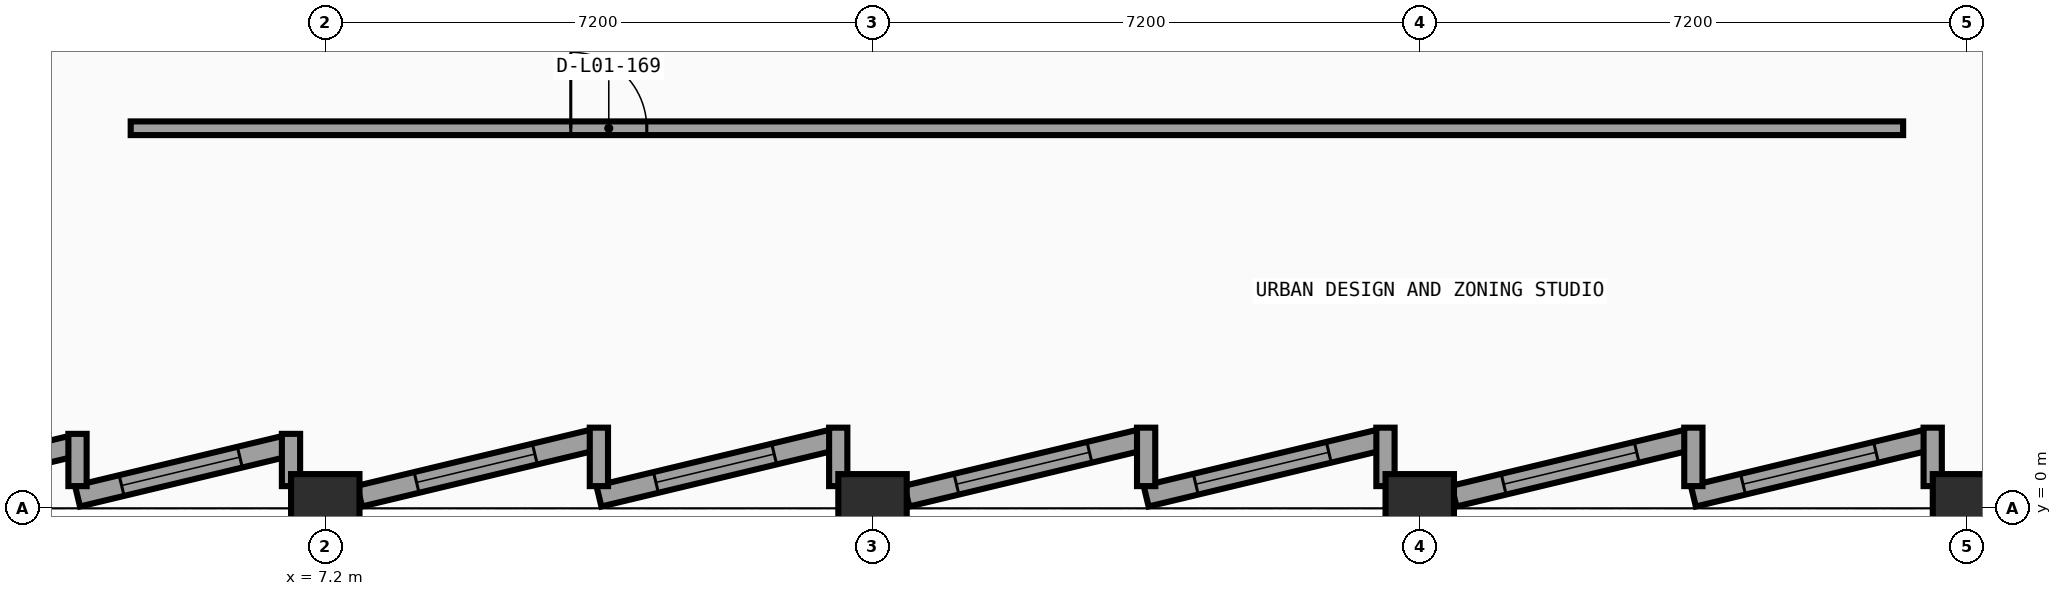
"""IFC4 building model, lengths in metres.
Left out: names, types, materials, properties, quantities, classifications, styles, units other than length and angle.
Written with IfcOpenShell. Run it as: python <this file> out.ifc"""

import sys

from ifc_helpers import new_model, si_unit, direction, frame, frame_2d, origin, origin_2d, place, context, subcontext, project, spatial, rectangle, extrude, element, fill, save


model = new_model("IFC4")
c1 = context("Model", 3, precision=1e-05, world=origin(), true_north=direction((0.0, 1.0)))
c2 = subcontext(c1, "Body", "Model", "MODEL_VIEW")
j1 = project(units=[si_unit("LENGTHUNIT", "METRE"), si_unit("PLANEANGLEUNIT", "RADIAN")], contexts=[c1])
p1 = place(None, origin())
s1 = spatial("IfcSite", under=j1, at=p1, CompositionType="ELEMENT")
p2 = place(p1, origin())
s2 = spatial("IfcBuilding", under=s1, at=p2, CompositionType="ELEMENT")
p3 = place(p2, frame((0.0, 0.0, 5.4)))
s3 = spatial("IfcBuildingStorey", under=s2, at=p3, CompositionType="ELEMENT", Elevation=5.4)
for number, where, z_axis, x_axis in (
    (1, (7.2, 0.0, 0.0), (0.0, 0.0, 1.0), (1.0, 0.0, 0.0)),
    (2, (14.4, 0.0, 0.0), (0.0, 0.0, 1.0), (1.0, 0.0, 0.0)),
    (3, (21.6, 0.0, 0.0), (0.0, 0.0, 1.0), (1.0, 0.0, 0.0)),
    (4, (28.8, 0.0, 0.0), (0.0, 0.0, 1.0), (1.0, 0.0, 0.0)),
):
    element("IfcColumn", number, at=place(p3, frame(where, z_axis=z_axis, x_axis=x_axis)), inside=s3, PredefinedType="COLUMN", context=c2, shape_type="SweptSolid", body=[
        extrude(rectangle(XDim=0.9, YDim=0.9, at=origin_2d()), origin(), (0.0, 0.0, 1.0), 4.8),
    ])
p4 = place(p3, frame((28.257, 0.894, 0.0), z_axis=(0.0, 0.0, 1.0), x_axis=(-0.972366148661, -0.233461073712, 0.0)))
e5 = element("IfcWall", 5, at=p4, inside=s3, PredefinedType="SOLIDWALL", context=c2, shape_type="SweptSolid", body=[
    extrude(rectangle(XDim=3.144, YDim=0.28, at=frame_2d((1.572, 0.0))), origin(), (0.0, 0.0, 1.0), 3.751),
])
p5 = place(p4, frame((0.672, 0.0, 0.8)))
e6 = element("IfcOpeningElement", 6, at=p5, cuts=e5, PredefinedType="OPENING", context=c2, shape_type="SweptSolid", body=[
    extrude(rectangle(XDim=1.8, YDim=1.85, at=frame_2d((0.9, 0.925))), frame((0.0, 0.15, 0.0), z_axis=(0.0, -1.0, 0.0), x_axis=(1.0, 0.0, 0.0)), (0.0, 0.0, 1.0), 0.3),
])
p6 = place(p3, frame((28.349, 1.061, 0.0), z_axis=(0.0, 0.0, 1.0), x_axis=(0.0, -1.0, 0.0)))
e7 = element("IfcWall", 7, at=p6, inside=s3, PredefinedType="SOLIDWALL", context=c2, shape_type="SweptSolid", body=[
    extrude(rectangle(XDim=0.769, YDim=0.24, at=frame_2d((0.385, 0.0))), origin(), (0.0, 0.0, 1.0), 4.52),
])
p7 = place(p3, frame((25.108, 0.894, 0.0), z_axis=(0.0, 0.0, 1.0), x_axis=(-0.972366148661, -0.233461073712, 0.0)))
e8 = element("IfcWall", 8, at=p7, inside=s3, PredefinedType="SOLIDWALL", context=c2, shape_type="SweptSolid", body=[
    extrude(rectangle(XDim=3.144, YDim=0.28, at=frame_2d((1.572, 0.0))), origin(), (0.0, 0.0, 1.0), 3.751),
])
p8 = place(p7, frame((0.672, 0.0, 0.8)))
e9 = element("IfcOpeningElement", 9, at=p8, cuts=e8, PredefinedType="OPENING", context=c2, shape_type="SweptSolid", body=[
    extrude(rectangle(XDim=1.8, YDim=1.85, at=frame_2d((0.9, 0.925))), frame((0.0, 0.15, 0.0), z_axis=(0.0, -1.0, 0.0), x_axis=(1.0, 0.0, 0.0)), (0.0, 0.0, 1.0), 0.3),
])
p9 = place(p3, frame((25.2, 1.061, 0.0), z_axis=(0.0, 0.0, 1.0), x_axis=(0.0, -1.0, 0.0)))
e10 = element("IfcWall", 10, at=p9, inside=s3, PredefinedType="SOLIDWALL", context=c2, shape_type="SweptSolid", body=[
    extrude(rectangle(XDim=0.769, YDim=0.24, at=frame_2d((0.385, 0.0))), origin(), (0.0, 0.0, 1.0), 4.52),
])
p10 = place(p3, frame((21.057, 0.894, 0.0), z_axis=(0.0, 0.0, 1.0), x_axis=(-0.972366148661, -0.233461073712, 0.0)))
e11 = element("IfcWall", 11, at=p10, inside=s3, PredefinedType="SOLIDWALL", context=c2, shape_type="SweptSolid", body=[
    extrude(rectangle(XDim=3.144, YDim=0.28, at=frame_2d((1.572, 0.0))), origin(), (0.0, 0.0, 1.0), 3.751),
])
p11 = place(p10, frame((0.672, 0.0, 0.8)))
e12 = element("IfcOpeningElement", 12, at=p11, cuts=e11, PredefinedType="OPENING", context=c2, shape_type="SweptSolid", body=[
    extrude(rectangle(XDim=1.8, YDim=1.85, at=frame_2d((0.9, 0.925))), frame((0.0, 0.15, 0.0), z_axis=(0.0, -1.0, 0.0), x_axis=(1.0, 0.0, 0.0)), (0.0, 0.0, 1.0), 0.3),
])
p12 = place(p3, frame((21.149, 1.061, 0.0), z_axis=(0.0, 0.0, 1.0), x_axis=(0.0, -1.0, 0.0)))
e13 = element("IfcWall", 13, at=p12, inside=s3, PredefinedType="SOLIDWALL", context=c2, shape_type="SweptSolid", body=[
    extrude(rectangle(XDim=0.769, YDim=0.24, at=frame_2d((0.385, 0.0))), origin(), (0.0, 0.0, 1.0), 4.52),
])
p13 = place(p3, frame((17.908, 0.894, 0.0), z_axis=(0.0, 0.0, 1.0), x_axis=(-0.972366148661, -0.233461073712, 0.0)))
e14 = element("IfcWall", 14, at=p13, inside=s3, PredefinedType="SOLIDWALL", context=c2, shape_type="SweptSolid", body=[
    extrude(rectangle(XDim=3.144, YDim=0.28, at=frame_2d((1.572, 0.0))), origin(), (0.0, 0.0, 1.0), 3.751),
])
p14 = place(p13, frame((0.672, 0.0, 0.8)))
e15 = element("IfcOpeningElement", 15, at=p14, cuts=e14, PredefinedType="OPENING", context=c2, shape_type="SweptSolid", body=[
    extrude(rectangle(XDim=1.8, YDim=1.85, at=frame_2d((0.9, 0.925))), frame((0.0, 0.15, 0.0), z_axis=(0.0, -1.0, 0.0), x_axis=(1.0, 0.0, 0.0)), (0.0, 0.0, 1.0), 0.3),
])
p15 = place(p3, frame((18.0, 1.061, 0.0), z_axis=(0.0, 0.0, 1.0), x_axis=(0.0, -1.0, 0.0)))
e16 = element("IfcWall", 16, at=p15, inside=s3, PredefinedType="SOLIDWALL", context=c2, shape_type="SweptSolid", body=[
    extrude(rectangle(XDim=0.769, YDim=0.24, at=frame_2d((0.385, 0.0))), origin(), (0.0, 0.0, 1.0), 4.52),
])
p16 = place(p3, frame((13.857, 0.894, 0.0), z_axis=(0.0, 0.0, 1.0), x_axis=(-0.972366148661, -0.233461073712, 0.0)))
e17 = element("IfcWall", 17, at=p16, inside=s3, PredefinedType="SOLIDWALL", context=c2, shape_type="SweptSolid", body=[
    extrude(rectangle(XDim=3.144, YDim=0.28, at=frame_2d((1.572, 0.0))), origin(), (0.0, 0.0, 1.0), 3.751),
])
p17 = place(p16, frame((0.772, 0.0, 0.8)))
e18 = element("IfcOpeningElement", 18, at=p17, cuts=e17, PredefinedType="OPENING", context=c2, shape_type="SweptSolid", body=[
    extrude(rectangle(XDim=1.6, YDim=1.75, at=frame_2d((0.8, 0.875))), frame((0.0, 0.15, 0.0), z_axis=(0.0, -1.0, 0.0), x_axis=(1.0, 0.0, 0.0)), (0.0, 0.0, 1.0), 0.3),
])
p18 = place(p3, frame((13.949, 1.061, 0.0), z_axis=(0.0, 0.0, 1.0), x_axis=(0.0, -1.0, 0.0)))
e19 = element("IfcWall", 19, at=p18, inside=s3, PredefinedType="SOLIDWALL", context=c2, shape_type="SweptSolid", body=[
    extrude(rectangle(XDim=0.769, YDim=0.24, at=frame_2d((0.385, 0.0))), origin(), (0.0, 0.0, 1.0), 4.52),
])
p19 = place(p3, frame((10.708, 0.894, 0.0), z_axis=(0.0, 0.0, 1.0), x_axis=(-0.972366148661, -0.233461073712, 0.0)))
e20 = element("IfcWall", 20, at=p19, inside=s3, PredefinedType="SOLIDWALL", context=c2, shape_type="SweptSolid", body=[
    extrude(rectangle(XDim=3.144, YDim=0.28, at=frame_2d((1.572, 0.0))), origin(), (0.0, 0.0, 1.0), 3.751),
])
p20 = place(p19, frame((0.772, 0.0, 0.8)))
e21 = element("IfcOpeningElement", 21, at=p20, cuts=e20, PredefinedType="OPENING", context=c2, shape_type="SweptSolid", body=[
    extrude(rectangle(XDim=1.6, YDim=1.75, at=frame_2d((0.8, 0.875))), frame((0.0, 0.15, 0.0), z_axis=(0.0, -1.0, 0.0), x_axis=(1.0, 0.0, 0.0)), (0.0, 0.0, 1.0), 0.3),
])
p21 = place(p3, frame((10.8, 1.061, 0.0), z_axis=(0.0, 0.0, 1.0), x_axis=(0.0, -1.0, 0.0)))
e22 = element("IfcWall", 22, at=p21, inside=s3, PredefinedType="SOLIDWALL", context=c2, shape_type="SweptSolid", body=[
    extrude(rectangle(XDim=0.769, YDim=0.24, at=frame_2d((0.385, 0.0))), origin(), (0.0, 0.0, 1.0), 4.52),
])
p22 = place(p3, frame((6.656, 0.812, 0.0), z_axis=(0.0, 0.0, 1.0), x_axis=(-0.972357151242, -0.233498544812, 0.0)))
e23 = element("IfcWall", 23, at=p22, inside=s3, PredefinedType="SOLIDWALL", context=c2, shape_type="SweptSolid", body=[
    extrude(rectangle(XDim=2.794, YDim=0.28, at=frame_2d((1.397, 0.0))), origin(), (0.0, 0.0, 1.0), 3.751),
])
p23 = place(p22, frame((0.597, 0.0, 0.8)))
e24 = element("IfcOpeningElement", 24, at=p23, cuts=e23, PredefinedType="OPENING", context=c2, shape_type="SweptSolid", body=[
    extrude(rectangle(XDim=1.6, YDim=1.75, at=frame_2d((0.8, 0.875))), frame((0.0, 0.15, 0.0), z_axis=(0.0, -1.0, 0.0), x_axis=(1.0, 0.0, 0.0)), (0.0, 0.0, 1.0), 0.3),
])
p24 = place(p3, frame((6.749, 0.979, 0.0), z_axis=(0.0, 0.0, 1.0), x_axis=(0.0, -1.0, 0.0)))
e25 = element("IfcWall", 25, at=p24, inside=s3, PredefinedType="SOLIDWALL", context=c2, shape_type="SweptSolid", body=[
    extrude(rectangle(XDim=0.688, YDim=0.24, at=frame_2d((0.344, 0.0))), origin(), (0.0, 0.0, 1.0), 4.52),
])
p25 = place(p3, frame((3.848, 0.812, 0.0), z_axis=(0.0, 0.0, 1.0), x_axis=(-0.972357151242, -0.233498544812, 0.0)))
e26 = element("IfcWall", 26, at=p25, inside=s3, PredefinedType="SOLIDWALL", context=c2, shape_type="SweptSolid", body=[
    extrude(rectangle(XDim=2.794, YDim=0.28, at=frame_2d((1.397, 0.0))), origin(), (0.0, 0.0, 1.0), 3.751),
])
p26 = place(p25, frame((0.597, 0.0, 0.8)))
e27 = element("IfcOpeningElement", 27, at=p26, cuts=e26, PredefinedType="OPENING", context=c2, shape_type="SweptSolid", body=[
    extrude(rectangle(XDim=1.6, YDim=1.75, at=frame_2d((0.8, 0.875))), frame((0.0, 0.15, 0.0), z_axis=(0.0, -1.0, 0.0), x_axis=(1.0, 0.0, 0.0)), (0.0, 0.0, 1.0), 0.3),
])
p27 = place(p3, frame((3.94, 0.979, 0.0), z_axis=(0.0, 0.0, 1.0), x_axis=(0.0, -1.0, 0.0)))
e28 = element("IfcWall", 28, at=p27, inside=s3, PredefinedType="SOLIDWALL", context=c2, shape_type="SweptSolid", body=[
    extrude(rectangle(XDim=0.688, YDim=0.24, at=frame_2d((0.344, 0.0))), origin(), (0.0, 0.0, 1.0), 4.52),
])
p28 = place(p3, frame((4.64, 5.0, 0.0), z_axis=(0.0, 0.0, 1.0), x_axis=(1.0, 0.0, 0.0)))
e29 = element("IfcWall", 29, at=p28, inside=s3, PredefinedType="PARTITIONING", context=c2, shape_type="SweptSolid", body=[
    extrude(rectangle(XDim=23.32, YDim=0.18, at=frame_2d((11.66, 0.0))), origin(), (0.0, 0.0, 1.0), 3.801),
])
p29 = place(p28, frame((5.79, 0.0, 0.0)))
e30 = element("IfcOpeningElement", 30, at=p29, cuts=e29, PredefinedType="OPENING", context=c2, shape_type="SweptSolid", body=[
    extrude(rectangle(XDim=1.0, YDim=2.1, at=frame_2d((0.5, 1.05))), frame((0.0, 0.1, 0.0), z_axis=(0.0, -1.0, 0.0), x_axis=(1.0, 0.0, 0.0)), (0.0, 0.0, 1.0), 0.2),
])
p30 = place(p5, origin())
e31 = element("IfcWindow", 31, at=p30, inside=s3, PartitioningType="SINGLE_PANEL", PredefinedType="WINDOW", context=c2, shape_type="SweptSolid", body=[
    extrude(rectangle(XDim=1.8, YDim=1.85, at=frame_2d((0.9, 0.925))), frame((0.0, 0.03, 0.0), z_axis=(0.0, -1.0, 0.0), x_axis=(1.0, 0.0, 0.0)), (0.0, 0.0, 1.0), 0.06),
])
fill(e6, e31)
p31 = place(p8, origin())
e32 = element("IfcWindow", 32, at=p31, inside=s3, PartitioningType="SINGLE_PANEL", PredefinedType="WINDOW", context=c2, shape_type="SweptSolid", body=[
    extrude(rectangle(XDim=1.8, YDim=1.85, at=frame_2d((0.9, 0.925))), frame((0.0, 0.03, 0.0), z_axis=(0.0, -1.0, 0.0), x_axis=(1.0, 0.0, 0.0)), (0.0, 0.0, 1.0), 0.06),
])
fill(e9, e32)
p32 = place(p11, origin())
e33 = element("IfcWindow", 33, at=p32, inside=s3, PartitioningType="SINGLE_PANEL", PredefinedType="WINDOW", context=c2, shape_type="SweptSolid", body=[
    extrude(rectangle(XDim=1.8, YDim=1.85, at=frame_2d((0.9, 0.925))), frame((0.0, 0.03, 0.0), z_axis=(0.0, -1.0, 0.0), x_axis=(1.0, 0.0, 0.0)), (0.0, 0.0, 1.0), 0.06),
])
fill(e12, e33)
p33 = place(p14, origin())
e34 = element("IfcWindow", 34, at=p33, inside=s3, PartitioningType="SINGLE_PANEL", PredefinedType="WINDOW", context=c2, shape_type="SweptSolid", body=[
    extrude(rectangle(XDim=1.8, YDim=1.85, at=frame_2d((0.9, 0.925))), frame((0.0, 0.03, 0.0), z_axis=(0.0, -1.0, 0.0), x_axis=(1.0, 0.0, 0.0)), (0.0, 0.0, 1.0), 0.06),
])
fill(e15, e34)
p34 = place(p17, origin())
e35 = element("IfcWindow", 35, at=p34, inside=s3, PartitioningType="SINGLE_PANEL", PredefinedType="WINDOW", context=c2, shape_type="SweptSolid", body=[
    extrude(rectangle(XDim=1.6, YDim=1.75, at=frame_2d((0.8, 0.875))), frame((0.0, 0.03, 0.0), z_axis=(0.0, -1.0, 0.0), x_axis=(1.0, 0.0, 0.0)), (0.0, 0.0, 1.0), 0.06),
])
fill(e18, e35)
p35 = place(p20, origin())
e36 = element("IfcWindow", 36, at=p35, inside=s3, PartitioningType="SINGLE_PANEL", PredefinedType="WINDOW", context=c2, shape_type="SweptSolid", body=[
    extrude(rectangle(XDim=1.6, YDim=1.75, at=frame_2d((0.8, 0.875))), frame((0.0, 0.03, 0.0), z_axis=(0.0, -1.0, 0.0), x_axis=(1.0, 0.0, 0.0)), (0.0, 0.0, 1.0), 0.06),
])
fill(e21, e36)
p36 = place(p23, origin())
e37 = element("IfcWindow", 37, at=p36, inside=s3, PartitioningType="SINGLE_PANEL", PredefinedType="WINDOW", context=c2, shape_type="SweptSolid", body=[
    extrude(rectangle(XDim=1.6, YDim=1.75, at=frame_2d((0.8, 0.875))), frame((0.0, 0.03, 0.0), z_axis=(0.0, -1.0, 0.0), x_axis=(1.0, 0.0, 0.0)), (0.0, 0.0, 1.0), 0.06),
])
fill(e24, e37)
p37 = place(p29, origin())
e38 = element("IfcDoor", 38, at=p37, inside=s3, OperationType="SINGLE_SWING_LEFT", PredefinedType="DOOR", context=c2, shape_type="SweptSolid", body=[
    extrude(rectangle(XDim=1.0, YDim=2.1, at=frame_2d((0.5, 1.05))), frame((0.0, 0.025, 0.0), z_axis=(0.0, -1.0, 0.0), x_axis=(1.0, 0.0, 0.0)), (0.0, 0.0, 1.0), 0.05),
])
fill(e30, e38)
save(model, sys.argv[1])
